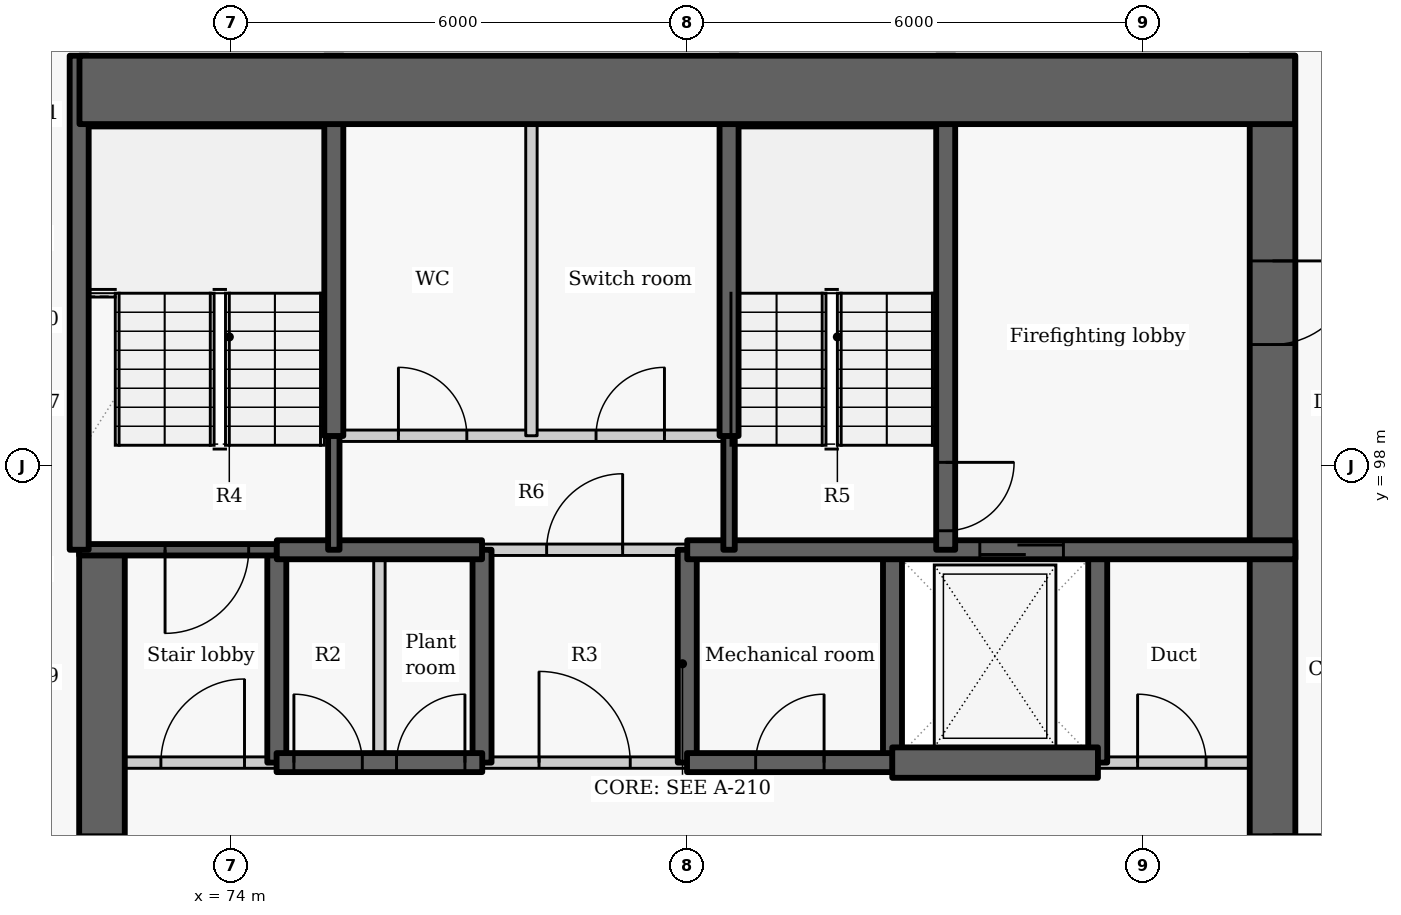
"""IFC4 building model, lengths in metres.
Left out: names, types, materials, properties, quantities, classifications, styles, units other than length and angle.
Written with IfcOpenShell. Run it as: python <this file> out.ifc"""

import sys

from ifc_helpers import new_model, si_unit, direction, frame, frame_2d, origin, place, context, subcontext, project, spatial, rectangle, extrude, element, fill, save


model = new_model("IFC4")
c1 = context("Model", 3, precision=1e-05, world=origin(), true_north=direction((0.0, 1.0)))
c2 = subcontext(c1, "Body", "Model", "MODEL_VIEW")
j1 = project(units=[si_unit("LENGTHUNIT", "METRE"), si_unit("PLANEANGLEUNIT", "RADIAN")], contexts=[c1])
p1 = place(None, origin())
s1 = spatial("IfcSite", under=j1, at=p1, CompositionType="ELEMENT")
p2 = place(p1, origin())
s2 = spatial("IfcBuilding", under=s1, at=p2, CompositionType="ELEMENT")
p3 = place(p2, frame((0.0, 0.0, 38.1)))
s3 = spatial("IfcBuildingStorey", under=s2, at=p3, CompositionType="ELEMENT", Elevation=38.1)
p4 = place(p3, frame((74.6, 94.1, -0.4), z_axis=(0.0, 0.0, 1.0), x_axis=(0.0, 1.0, 0.0)))
e1 = element("IfcWall", 1, at=p4, inside=s3, PredefinedType="SHEAR", context=c2, shape_type="SweptSolid", body=[
    extrude(rectangle(XDim=2.8, YDim=0.25, at=frame_2d((1.4, 0.0))), origin(), (0.0, 0.0, 1.0), 3.425),
])
p5 = place(p3, frame((72.3, 87.8, -0.4), z_axis=(0.0, 0.0, 1.0), x_axis=(0.0, 1.0, 0.0)))
e2 = element("IfcWall", 2, at=p5, inside=s3, PredefinedType="SHEAR", context=c2, shape_type="SweptSolid", body=[
    extrude(rectangle(XDim=9.1, YDim=0.6, at=frame_2d((4.55, 0.0))), origin(), (0.0, 0.0, 1.0), 3.425),
])
p6 = place(p5, frame((3.85, 0.0, 0.4)))
e3 = element("IfcOpeningElement", 3, at=p6, cuts=e2, PredefinedType="OPENING", context=c2, shape_type="SweptSolid", body=[
    extrude(rectangle(XDim=1.5, YDim=2.1, at=frame_2d((0.75, 1.05))), frame((0.0, 0.31, 0.0), z_axis=(0.0, -1.0, 0.0), x_axis=(1.0, 0.0, 0.0)), (0.0, 0.0, 1.0), 0.62),
])
for number, where, z_axis, x_axis in (
    (4, (77.3, 94.1, -0.4), (0.0, 0.0, 1.0), (0.0, 1.0, 0.0)),
    (5, (80.0, 94.1, -0.4), (0.0, 0.0, 1.0), (0.0, 1.0, 0.0)),
    (6, (82.7, 94.1, -0.4), (0.0, 0.0, 1.0), (0.0, 1.0, 0.0)),
    (7, (85.4, 94.1, -0.4), (0.0, 0.0, 1.0), (0.0, 1.0, 0.0)),
):
    element("IfcWall", number, at=place(p3, frame(where, z_axis=z_axis, x_axis=x_axis)), inside=s3, PredefinedType="SHEAR", context=c2, shape_type="SweptSolid", body=[
        extrude(rectangle(XDim=2.8, YDim=0.25, at=frame_2d((1.4, 0.0))), origin(), (0.0, 0.0, 1.0), 3.425),
    ])
p7 = place(p3, frame((87.7, 103.4, -0.4), z_axis=(0.0, 0.0, 1.0), x_axis=(0.0, -1.0, 0.0)))
e8 = element("IfcWall", 8, at=p7, inside=s3, PredefinedType="SHEAR", context=c2, shape_type="SweptSolid", body=[
    extrude(rectangle(XDim=15.6, YDim=0.6, at=frame_2d((7.8, 0.0))), origin(), (0.0, 0.0, 1.0), 3.425),
])
p8 = place(p7, frame((10.25, 0.0, 0.4)))
e9 = element("IfcOpeningElement", 9, at=p8, cuts=e8, PredefinedType="OPENING", context=c2, shape_type="SweptSolid", body=[
    extrude(rectangle(XDim=1.5, YDim=2.1, at=frame_2d((0.75, 1.05))), frame((0.0, 0.31, 0.0), z_axis=(0.0, -1.0, 0.0), x_axis=(1.0, 0.0, 0.0)), (0.0, 0.0, 1.0), 0.62),
])
p9 = place(p7, frame((2.7, 0.0, 0.4)))
e10 = element("IfcOpeningElement", 10, at=p9, cuts=e8, PredefinedType="OPENING", context=c2, shape_type="SweptSolid", body=[
    extrude(rectangle(XDim=1.1, YDim=2.1, at=frame_2d((0.55, 1.05))), frame((0.0, 0.31, 0.0), z_axis=(0.0, -1.0, 0.0), x_axis=(1.0, 0.0, 0.0)), (0.0, 0.0, 1.0), 0.62),
])
p10 = place(p3, frame((72.0, 94.1, 0.0), z_axis=(0.0, 0.0, 1.0), x_axis=(1.0, 0.0, 0.0)))
e11 = element("IfcWall", 11, at=p10, inside=s3, PredefinedType="PARTITIONING", context=c2, shape_type="SweptSolid", body=[
    extrude(rectangle(XDim=2.603, YDim=0.15, at=frame_2d((1.302, 0.0))), origin(), (0.0, 0.0, 1.0), 3.025),
])
p11 = place(p10, frame((1.075, 0.0, 0.0)))
e12 = element("IfcOpeningElement", 12, at=p11, cuts=e11, PredefinedType="OPENING", context=c2, shape_type="SweptSolid", body=[
    extrude(rectangle(XDim=1.1, YDim=2.1, at=frame_2d((0.55, 1.05))), frame((0.0, 0.085, 0.0), z_axis=(0.0, -1.0, 0.0), x_axis=(1.0, 0.0, 0.0)), (0.0, 0.0, 1.0), 0.17),
])
p12 = place(p3, frame((77.297, 94.1, 0.0), z_axis=(0.0, 0.0, 1.0), x_axis=(1.0, 0.0, 0.0)))
e13 = element("IfcWall", 13, at=p12, inside=s3, PredefinedType="PARTITIONING", context=c2, shape_type="SweptSolid", body=[
    extrude(rectangle(XDim=2.706, YDim=0.15, at=frame_2d((1.353, 0.0))), origin(), (0.0, 0.0, 1.0), 3.025),
])
p13 = place(p12, frame((0.753, 0.0, 0.0)))
e14 = element("IfcOpeningElement", 14, at=p13, cuts=e13, PredefinedType="OPENING", context=c2, shape_type="SweptSolid", body=[
    extrude(rectangle(XDim=1.2, YDim=2.1, at=frame_2d((0.6, 1.05))), frame((0.0, 0.085, 0.0), z_axis=(0.0, -1.0, 0.0), x_axis=(1.0, 0.0, 0.0)), (0.0, 0.0, 1.0), 0.17),
])
p14 = place(p3, frame((85.397, 94.1, 0.0), z_axis=(0.0, 0.0, 1.0), x_axis=(1.0, 0.0, 0.0)))
e15 = element("IfcWall", 15, at=p14, inside=s3, PredefinedType="PARTITIONING", context=c2, shape_type="SweptSolid", body=[
    extrude(rectangle(XDim=2.603, YDim=0.15, at=frame_2d((1.302, 0.0))), origin(), (0.0, 0.0, 1.0), 3.025),
])
p15 = place(p14, frame((0.528, 0.0, 0.0)))
e16 = element("IfcOpeningElement", 16, at=p15, cuts=e15, PredefinedType="OPENING", context=c2, shape_type="SweptSolid", body=[
    extrude(rectangle(XDim=0.9, YDim=2.1, at=frame_2d((0.45, 1.05))), frame((0.0, 0.085, 0.0), z_axis=(0.0, -1.0, 0.0), x_axis=(1.0, 0.0, 0.0)), (0.0, 0.0, 1.0), 0.17),
])
p16 = place(p3, frame((74.597, 94.1, -0.4), z_axis=(0.0, 0.0, 1.0), x_axis=(1.0, 0.0, 0.0)))
e17 = element("IfcWall", 17, at=p16, inside=s3, PredefinedType="SHEAR", context=c2, shape_type="SweptSolid", body=[
    extrude(rectangle(XDim=2.706, YDim=0.25, at=frame_2d((1.353, 0.0))), origin(), (0.0, 0.0, 1.0), 3.425),
])
p17 = place(p16, frame((0.228, 0.0, 0.4)))
e18 = element("IfcOpeningElement", 18, at=p17, cuts=e17, PredefinedType="OPENING", context=c2, shape_type="SweptSolid", body=[
    extrude(rectangle(XDim=0.9, YDim=2.1, at=frame_2d((0.45, 1.05))), frame((0.0, 0.135, 0.0), z_axis=(0.0, -1.0, 0.0), x_axis=(1.0, 0.0, 0.0)), (0.0, 0.0, 1.0), 0.27),
])
p18 = place(p16, frame((1.578, 0.0, 0.4)))
e19 = element("IfcOpeningElement", 19, at=p18, cuts=e17, PredefinedType="OPENING", context=c2, shape_type="SweptSolid", body=[
    extrude(rectangle(XDim=0.9, YDim=2.1, at=frame_2d((0.45, 1.05))), frame((0.0, 0.135, 0.0), z_axis=(0.0, -1.0, 0.0), x_axis=(1.0, 0.0, 0.0)), (0.0, 0.0, 1.0), 0.27),
])
p19 = place(p3, frame((79.997, 94.1, -0.4), z_axis=(0.0, 0.0, 1.0), x_axis=(1.0, 0.0, 0.0)))
e20 = element("IfcWall", 20, at=p19, inside=s3, PredefinedType="SHEAR", context=c2, shape_type="SweptSolid", body=[
    extrude(rectangle(XDim=2.706, YDim=0.25, at=frame_2d((1.353, 0.0))), origin(), (0.0, 0.0, 1.0), 3.425),
])
p20 = place(p19, frame((0.903, 0.0, 0.4)))
e21 = element("IfcOpeningElement", 21, at=p20, cuts=e20, PredefinedType="OPENING", context=c2, shape_type="SweptSolid", body=[
    extrude(rectangle(XDim=0.9, YDim=2.1, at=frame_2d((0.45, 1.05))), frame((0.0, 0.135, 0.0), z_axis=(0.0, -1.0, 0.0), x_axis=(1.0, 0.0, 0.0)), (0.0, 0.0, 1.0), 0.27),
])
p21 = place(p3, frame((82.697, 94.1, -0.4), z_axis=(0.0, 0.0, 1.0), x_axis=(1.0, 0.0, 0.0)))
e22 = element("IfcWall", 22, at=p21, inside=s3, PredefinedType="SHEAR", context=c2, shape_type="SweptSolid", body=[
    extrude(rectangle(XDim=2.706, YDim=0.4, at=frame_2d((1.353, 0.0))), origin(), (0.0, 0.0, 1.0), 3.425),
])
p22 = place(p3, frame((74.6, 96.9, -0.4), z_axis=(0.0, 0.0, 1.0), x_axis=(-1.0, 0.0, 0.0)))
e23 = element("IfcWall", 23, at=p22, inside=s3, PredefinedType="SHEAR", context=c2, shape_type="SweptSolid", body=[
    extrude(rectangle(XDim=2.6, YDim=0.15, at=frame_2d((1.3, 0.0))), origin(), (0.0, 0.0, 1.0), 3.425),
])
p23 = place(p22, frame((0.37, 0.0, 0.4)))
e24 = element("IfcOpeningElement", 24, at=p23, cuts=e23, PredefinedType="OPENING", context=c2, shape_type="SweptSolid", body=[
    extrude(rectangle(XDim=1.1, YDim=2.1, at=frame_2d((0.55, 1.05))), frame((0.0, 0.085, 0.0), z_axis=(0.0, -1.0, 0.0), x_axis=(1.0, 0.0, 0.0)), (0.0, 0.0, 1.0), 0.17),
])
p24 = place(p3, frame((75.95, 94.1, 0.0), z_axis=(0.0, 0.0, 1.0), x_axis=(0.0, 1.0, 0.0)))
e25 = element("IfcWall", 25, at=p24, inside=s3, PredefinedType="PARTITIONING", context=c2, shape_type="SweptSolid", body=[
    extrude(rectangle(XDim=2.8, YDim=0.15, at=frame_2d((1.4, 0.0))), origin(), (0.0, 0.0, 1.0), 3.025),
])
p25 = place(p3, frame((74.6, 96.9, -0.4), z_axis=(0.0, 0.0, 1.0), x_axis=(1.0, 0.0, 0.0)))
e26 = element("IfcWall", 26, at=p25, inside=s3, PredefinedType="SHEAR", context=c2, shape_type="SweptSolid", body=[
    extrude(rectangle(XDim=2.7, YDim=0.25, at=frame_2d((1.35, 0.0))), origin(), (0.0, 0.0, 1.0), 3.425),
])
p26 = place(p3, frame((80.0, 96.9, -0.4), z_axis=(0.0, 0.0, 1.0), x_axis=(1.0, 0.0, 0.0)))
e27 = element("IfcWall", 27, at=p26, inside=s3, PredefinedType="SHEAR", context=c2, shape_type="SweptSolid", body=[
    extrude(rectangle(XDim=8.0, YDim=0.25, at=frame_2d((4.0, 0.0))), origin(), (0.0, 0.0, 1.0), 3.425),
])
p27 = place(p26, frame((3.849, 0.0, 0.4)))
e28 = element("IfcOpeningElement", 28, at=p27, cuts=e27, PredefinedType="OPENING", context=c2, shape_type="SweptSolid", body=[
    extrude(rectangle(XDim=1.1, YDim=2.1, at=frame_2d((0.55, 1.05))), frame((0.0, 0.135, 0.0), z_axis=(0.0, -1.0, 0.0), x_axis=(1.0, 0.0, 0.0)), (0.0, 0.0, 1.0), 0.27),
])
p28 = place(p3, frame((77.3, 96.9, 0.0), z_axis=(0.0, 0.0, 1.0), x_axis=(1.0, 0.0, 0.0)))
e29 = element("IfcWall", 29, at=p28, inside=s3, PredefinedType="PARTITIONING", context=c2, shape_type="SweptSolid", body=[
    extrude(rectangle(XDim=2.7, YDim=0.15, at=frame_2d((1.35, 0.0))), origin(), (0.0, 0.0, 1.0), 3.025),
])
p29 = place(p28, frame((0.85, 0.0, 0.0)))
e30 = element("IfcOpeningElement", 30, at=p29, cuts=e29, PredefinedType="OPENING", context=c2, shape_type="SweptSolid", body=[
    extrude(rectangle(XDim=1.0, YDim=2.1, at=frame_2d((0.5, 1.05))), frame((0.0, 0.085, 0.0), z_axis=(0.0, -1.0, 0.0), x_axis=(1.0, 0.0, 0.0)), (0.0, 0.0, 1.0), 0.17),
])
p30 = place(p3, frame((75.35, 96.9, -0.4), z_axis=(0.0, 0.0, 1.0), x_axis=(0.0, 1.0, 0.0)))
e31 = element("IfcWall", 31, at=p30, inside=s3, PredefinedType="SHEAR", context=c2, shape_type="SweptSolid", body=[
    extrude(rectangle(XDim=1.503, YDim=0.15, at=frame_2d((0.751, 0.0))), origin(), (0.0, 0.0, 1.0), 3.425),
])
p31 = place(p3, frame((75.35, 98.397, -0.4), z_axis=(0.0, 0.0, 1.0), x_axis=(0.0, 1.0, 0.0)))
e32 = element("IfcWall", 32, at=p31, inside=s3, PredefinedType="SHEAR", context=c2, shape_type="SweptSolid", body=[
    extrude(rectangle(XDim=5.003, YDim=0.25, at=frame_2d((2.501, 0.0))), origin(), (0.0, 0.0, 1.0), 3.425),
])
p32 = place(p3, frame((72.0, 96.9, -0.4), z_axis=(0.0, 0.0, 1.0), x_axis=(0.0, 1.0, 0.0)))
e33 = element("IfcWall", 33, at=p32, inside=s3, PredefinedType="SHEAR", context=c2, shape_type="SweptSolid", body=[
    extrude(rectangle(XDim=6.5, YDim=0.25, at=frame_2d((3.25, 0.0))), origin(), (0.0, 0.0, 1.0), 3.425),
])
p33 = place(p3, frame((83.4, 103.4, -0.4), z_axis=(0.0, 0.0, 1.0), x_axis=(0.0, -1.0, 0.0)))
e34 = element("IfcWall", 34, at=p33, inside=s3, PredefinedType="SHEAR", context=c2, shape_type="SweptSolid", body=[
    extrude(rectangle(XDim=6.5, YDim=0.25, at=frame_2d((3.25, 0.0))), origin(), (0.0, 0.0, 1.0), 3.425),
])
p34 = place(p33, frame((5.35, 0.0, 0.4)))
e35 = element("IfcOpeningElement", 35, at=p34, cuts=e34, PredefinedType="OPENING", context=c2, shape_type="SweptSolid", body=[
    extrude(rectangle(XDim=0.9, YDim=2.1, at=frame_2d((0.45, 1.05))), frame((0.0, 0.135, 0.0), z_axis=(0.0, -1.0, 0.0), x_axis=(1.0, 0.0, 0.0)), (0.0, 0.0, 1.0), 0.27),
])
p35 = place(p3, frame((80.55, 96.9, -0.4), z_axis=(0.0, 0.0, 1.0), x_axis=(0.0, 1.0, 0.0)))
e36 = element("IfcWall", 36, at=p35, inside=s3, PredefinedType="SHEAR", context=c2, shape_type="SweptSolid", body=[
    extrude(rectangle(XDim=1.503, YDim=0.15, at=frame_2d((0.751, 0.0))), origin(), (0.0, 0.0, 1.0), 3.425),
])
p36 = place(p3, frame((80.55, 98.397, -0.4), z_axis=(0.0, 0.0, 1.0), x_axis=(0.0, 1.0, 0.0)))
e37 = element("IfcWall", 37, at=p36, inside=s3, PredefinedType="SHEAR", context=c2, shape_type="SweptSolid", body=[
    extrude(rectangle(XDim=5.003, YDim=0.25, at=frame_2d((2.501, 0.0))), origin(), (0.0, 0.0, 1.0), 3.425),
])
p37 = place(p3, frame((75.35, 98.4, 0.0), z_axis=(0.0, 0.0, 1.0), x_axis=(1.0, 0.0, 0.0)))
e38 = element("IfcWall", 38, at=p37, inside=s3, PredefinedType="PARTITIONING", context=c2, shape_type="SweptSolid", body=[
    extrude(rectangle(XDim=5.2, YDim=0.15, at=frame_2d((2.6, 0.0))), origin(), (0.0, 0.0, 1.0), 3.025),
])
p38 = place(p37, frame((0.85, 0.0, 0.0)))
e39 = element("IfcOpeningElement", 39, at=p38, cuts=e38, PredefinedType="OPENING", context=c2, shape_type="SweptSolid", body=[
    extrude(rectangle(XDim=0.9, YDim=2.1, at=frame_2d((0.45, 1.05))), frame((0.0, 0.085, 0.0), z_axis=(0.0, -1.0, 0.0), x_axis=(1.0, 0.0, 0.0)), (0.0, 0.0, 1.0), 0.17),
])
p39 = place(p37, frame((3.45, 0.0, 0.0)))
e40 = element("IfcOpeningElement", 40, at=p39, cuts=e38, PredefinedType="OPENING", context=c2, shape_type="SweptSolid", body=[
    extrude(rectangle(XDim=0.9, YDim=2.1, at=frame_2d((0.45, 1.05))), frame((0.0, 0.085, 0.0), z_axis=(0.0, -1.0, 0.0), x_axis=(1.0, 0.0, 0.0)), (0.0, 0.0, 1.0), 0.17),
])
p40 = place(p3, frame((77.95, 98.4, 0.0), z_axis=(0.0, 0.0, 1.0), x_axis=(0.0, 1.0, 0.0)))
e41 = element("IfcWall", 41, at=p40, inside=s3, PredefinedType="PARTITIONING", context=c2, shape_type="SweptSolid", body=[
    extrude(rectangle(XDim=5.0, YDim=0.15, at=frame_2d((2.5, 0.0))), origin(), (0.0, 0.0, 1.0), 3.025),
])
p41 = place(p3, frame((72.004, 102.95, -0.4), z_axis=(0.0, 0.0, 1.0), x_axis=(1.0, 0.0, 0.0)))
e42 = element("IfcWall", 42, at=p41, inside=s3, PredefinedType="SHEAR", context=c2, shape_type="SweptSolid", body=[
    extrude(rectangle(XDim=15.992, YDim=0.9, at=frame_2d((7.996, 0.0))), origin(), (0.0, 0.0, 1.0), 3.425),
])
p42 = place(p11, origin())
e43 = element("IfcDoor", 43, at=p42, inside=s3, OperationType="SINGLE_SWING_RIGHT", PredefinedType="DOOR", context=c2, shape_type="SweptSolid", body=[
    extrude(rectangle(XDim=1.1, YDim=2.1, at=frame_2d((0.55, 1.05))), frame((0.0, 0.025, 0.0), z_axis=(0.0, -1.0, 0.0), x_axis=(1.0, 0.0, 0.0)), (0.0, 0.0, 1.0), 0.05),
])
fill(e12, e43)
p43 = place(p17, origin())
e44 = element("IfcDoor", 44, at=p43, inside=s3, OperationType="SINGLE_SWING_LEFT", PredefinedType="DOOR", context=c2, shape_type="SweptSolid", body=[
    extrude(rectangle(XDim=0.9, YDim=2.1, at=frame_2d((0.45, 1.05))), frame((0.0, 0.025, 0.0), z_axis=(0.0, -1.0, 0.0), x_axis=(1.0, 0.0, 0.0)), (0.0, 0.0, 1.0), 0.05),
])
fill(e18, e44)
p44 = place(p18, origin())
e45 = element("IfcDoor", 45, at=p44, inside=s3, OperationType="SINGLE_SWING_RIGHT", PredefinedType="DOOR", context=c2, shape_type="SweptSolid", body=[
    extrude(rectangle(XDim=0.9, YDim=2.1, at=frame_2d((0.45, 1.05))), frame((0.0, 0.025, 0.0), z_axis=(0.0, -1.0, 0.0), x_axis=(1.0, 0.0, 0.0)), (0.0, 0.0, 1.0), 0.05),
])
fill(e19, e45)
p45 = place(p13, origin())
e46 = element("IfcDoor", 46, at=p45, inside=s3, OperationType="DOUBLE_DOOR_SINGLE_SWING", PredefinedType="DOOR", context=c2, shape_type="SweptSolid", body=[
    extrude(rectangle(XDim=1.2, YDim=2.1, at=frame_2d((0.6, 1.05))), frame((0.0, 0.025, 0.0), z_axis=(0.0, -1.0, 0.0), x_axis=(1.0, 0.0, 0.0)), (0.0, 0.0, 1.0), 0.05),
])
fill(e14, e46)
p46 = place(p20, origin())
e47 = element("IfcDoor", 47, at=p46, inside=s3, OperationType="SINGLE_SWING_RIGHT", PredefinedType="DOOR", context=c2, shape_type="SweptSolid", body=[
    extrude(rectangle(XDim=0.9, YDim=2.1, at=frame_2d((0.45, 1.05))), frame((0.0, 0.025, 0.0), z_axis=(0.0, -1.0, 0.0), x_axis=(1.0, 0.0, 0.0)), (0.0, 0.0, 1.0), 0.05),
])
fill(e21, e47)
p47 = place(p27, origin())
e48 = element("IfcDoor", 48, at=p47, inside=s3, OperationType="SLIDING_TO_LEFT", PredefinedType="DOOR", context=c2, shape_type="SweptSolid", body=[
    extrude(rectangle(XDim=1.1, YDim=2.1, at=frame_2d((0.55, 1.05))), frame((0.0, 0.025, 0.0), z_axis=(0.0, -1.0, 0.0), x_axis=(1.0, 0.0, 0.0)), (0.0, 0.0, 1.0), 0.05),
])
fill(e28, e48)
p48 = place(p15, origin())
e49 = element("IfcDoor", 49, at=p48, inside=s3, OperationType="SINGLE_SWING_LEFT", PredefinedType="DOOR", context=c2, shape_type="SweptSolid", body=[
    extrude(rectangle(XDim=0.9, YDim=2.1, at=frame_2d((0.45, 1.05))), frame((0.0, 0.025, 0.0), z_axis=(0.0, -1.0, 0.0), x_axis=(1.0, 0.0, 0.0)), (0.0, 0.0, 1.0), 0.05),
])
fill(e16, e49)
p49 = place(p29, origin())
e50 = element("IfcDoor", 50, at=p49, inside=s3, OperationType="SINGLE_SWING_RIGHT", PredefinedType="DOOR", context=c2, shape_type="SweptSolid", body=[
    extrude(rectangle(XDim=1.0, YDim=2.1, at=frame_2d((0.5, 1.05))), frame((0.0, 0.025, 0.0), z_axis=(0.0, -1.0, 0.0), x_axis=(1.0, 0.0, 0.0)), (0.0, 0.0, 1.0), 0.05),
])
fill(e30, e50)
p50 = place(p38, origin())
e51 = element("IfcDoor", 51, at=p50, inside=s3, OperationType="SINGLE_SWING_LEFT", PredefinedType="DOOR", context=c2, shape_type="SweptSolid", body=[
    extrude(rectangle(XDim=0.9, YDim=2.1, at=frame_2d((0.45, 1.05))), frame((0.0, 0.025, 0.0), z_axis=(0.0, -1.0, 0.0), x_axis=(1.0, 0.0, 0.0)), (0.0, 0.0, 1.0), 0.05),
])
fill(e39, e51)
p51 = place(p39, origin())
e52 = element("IfcDoor", 52, at=p51, inside=s3, OperationType="SINGLE_SWING_RIGHT", PredefinedType="DOOR", context=c2, shape_type="SweptSolid", body=[
    extrude(rectangle(XDim=0.9, YDim=2.1, at=frame_2d((0.45, 1.05))), frame((0.0, 0.025, 0.0), z_axis=(0.0, -1.0, 0.0), x_axis=(1.0, 0.0, 0.0)), (0.0, 0.0, 1.0), 0.05),
])
fill(e40, e52)
p52 = place(p23, origin())
e53 = element("IfcDoor", 53, at=p52, inside=s3, OperationType="SINGLE_SWING_RIGHT", PredefinedType="DOOR", context=c2, shape_type="SweptSolid", body=[
    extrude(rectangle(XDim=1.1, YDim=2.1, at=frame_2d((0.55, 1.05))), frame((0.0, 0.025, 0.0), z_axis=(0.0, -1.0, 0.0), x_axis=(1.0, 0.0, 0.0)), (0.0, 0.0, 1.0), 0.05),
])
fill(e24, e53)
p53 = place(p34, origin())
e54 = element("IfcDoor", 54, at=p53, inside=s3, OperationType="SINGLE_SWING_LEFT", PredefinedType="DOOR", context=c2, shape_type="SweptSolid", body=[
    extrude(rectangle(XDim=0.9, YDim=2.1, at=frame_2d((0.45, 1.05))), frame((0.0, 0.025, 0.0), z_axis=(0.0, -1.0, 0.0), x_axis=(1.0, 0.0, 0.0)), (0.0, 0.0, 1.0), 0.05),
])
fill(e35, e54)
p54 = place(p6, origin())
e55 = element("IfcDoor", 55, at=p54, inside=s3, OperationType="DOUBLE_DOOR_SINGLE_SWING", PredefinedType="DOOR", context=c2, shape_type="SweptSolid", body=[
    extrude(rectangle(XDim=1.5, YDim=2.1, at=frame_2d((0.75, 1.05))), frame((0.0, 0.025, 0.0), z_axis=(0.0, -1.0, 0.0), x_axis=(1.0, 0.0, 0.0)), (0.0, 0.0, 1.0), 0.05),
])
fill(e3, e55)
p55 = place(p9, origin())
e56 = element("IfcDoor", 56, at=p55, inside=s3, OperationType="SINGLE_SWING_LEFT", PredefinedType="DOOR", context=c2, shape_type="SweptSolid", body=[
    extrude(rectangle(XDim=1.1, YDim=2.1, at=frame_2d((0.55, 1.05))), frame((0.0, 0.025, 0.0), z_axis=(0.0, -1.0, 0.0), x_axis=(1.0, 0.0, 0.0)), (0.0, 0.0, 1.0), 0.05),
])
fill(e10, e56)
save(model, sys.argv[1])
